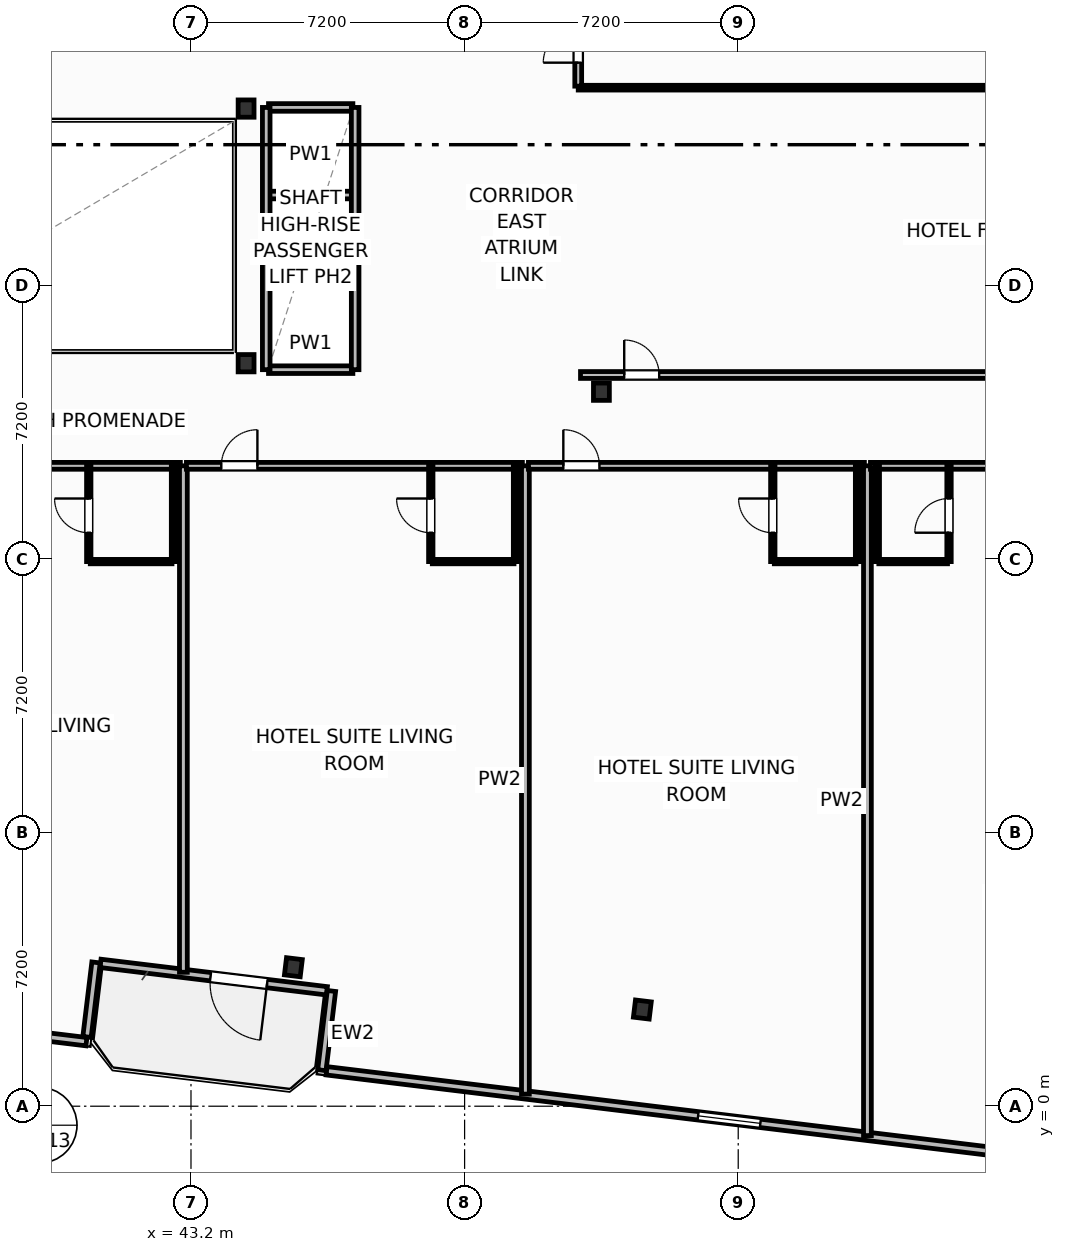
"""IFC4 building model, lengths in metres.
Left out: names, types, materials, properties, quantities, classifications, styles, units other than length and angle.
Written with IfcOpenShell. Run it as: python <this file> out.ifc"""

import sys

from ifc_helpers import new_model, si_unit, direction, frame, frame_2d, origin, origin_2d, place, context, subcontext, project, spatial, rectangle, i_section, extrude, element, fill, save


model = new_model("IFC4")
c1 = context("Model", 3, precision=1e-05, world=origin(), true_north=direction((0.0, 1.0)))
c2 = subcontext(c1, "Body", "Model", "MODEL_VIEW")
j1 = project(units=[si_unit("LENGTHUNIT", "METRE"), si_unit("PLANEANGLEUNIT", "RADIAN")], contexts=[c1])
p1 = place(None, origin())
s1 = spatial("IfcSite", under=j1, at=p1, CompositionType="ELEMENT")
p2 = place(p1, origin())
s2 = spatial("IfcBuilding", under=s1, at=p2, CompositionType="ELEMENT")
p3 = place(p2, frame((0.0, 0.0, 151.3)))
s3 = spatial("IfcBuildingStorey", under=s2, at=p3, CompositionType="ELEMENT", Elevation=151.3)
for number, where, z_axis, x_axis in (
    (1, (44.65, 19.55, 0.0), (0.0, 0.0, 1.0), (1.0, 0.0, 0.0)),
    (2, (44.65, 26.25, 0.0), (0.0, 0.0, 1.0), (1.0, 0.0, 0.0)),
    (3, (54.0, 18.8, 0.0), (0.0, 0.0, 1.0), (1.0, 0.0, 0.0)),
    (4, (45.894, 3.657, 0.0), (0.0, 0.0, 1.0), (0.993, -0.12, 0.0)),
    (5, (55.077, 2.544, 0.0), (0.0, 0.0, 1.0), (0.993, -0.12, 0.0)),
):
    element("IfcColumn", number, at=place(p3, frame(where, z_axis=z_axis, x_axis=x_axis)), inside=s3, PredefinedType="COLUMN", context=c2, shape_type="SweptSolid", body=[
        extrude(i_section(OverallWidth=0.418, OverallDepth=0.455, WebThickness=0.042, FlangeThickness=0.068, FilletRadius=0.025, at=origin_2d()), origin(), (0.0, 0.0, 1.0), 3.7),
    ])
p4 = place(p3, frame((46.776, 3.037, 0.0), z_axis=(0.0, 0.0, 1.0), x_axis=(-0.992735402148, 0.120318000826, 0.0)))
e6 = element("IfcWall", 6, at=p4, inside=s3, PredefinedType="SOLIDWALL", context=c2, shape_type="SweptSolid", body=[
    extrude(rectangle(XDim=6.0, YDim=0.22, at=frame_2d((3.0, 0.0))), origin(), (0.0, 0.0, 1.0), 2.73),
])
p5 = place(p4, frame((1.584, 0.0, 0.0)))
e7 = element("IfcOpeningElement", 7, at=p5, cuts=e6, PredefinedType="OPENING", context=c2, shape_type="SweptSolid", body=[
    extrude(rectangle(XDim=1.5, YDim=2.25, at=frame_2d((0.75, 1.125))), frame((0.0, 0.12, 0.0), z_axis=(0.0, -1.0, 0.0), x_axis=(1.0, 0.0, 0.0)), (0.0, 0.0, 1.0), 0.24),
])
p6 = place(p3, frame((32.472, 2.665, 0.0), z_axis=(0.0, 0.0, 1.0), x_axis=(0.992734661931, -0.120324108143, 0.0)))
e8 = element("IfcWall", 8, at=p6, inside=s3, PredefinedType="SOLIDWALL", context=c2, shape_type="SweptSolid", body=[
    extrude(rectangle(XDim=8.035, YDim=0.22, at=frame_2d((4.018, 0.0))), origin(), (0.0, 0.0, 1.0), 2.73),
])
p7 = place(p6, frame((3.192, 0.0, 0.8)))
e9 = element("IfcOpeningElement", 9, at=p7, cuts=e8, PredefinedType="OPENING", context=c2, shape_type="SweptSolid", body=[
    extrude(rectangle(XDim=1.65, YDim=1.65, at=frame_2d((0.825, 0.825))), frame((0.0, 0.12, 0.0), z_axis=(0.0, -1.0, 0.0), x_axis=(1.0, 0.0, 0.0)), (0.0, 0.0, 1.0), 0.24),
])
p8 = place(p3, frame((40.464, 1.822, 0.0), z_axis=(0.0, 0.0, 1.0), x_axis=(0.120275992932, 0.992740492538, 0.0)))
e10 = element("IfcWall", 10, at=p8, inside=s3, PredefinedType="SOLIDWALL", context=c2, shape_type="SweptSolid", body=[
    extrude(rectangle(XDim=1.975, YDim=0.22, at=frame_2d((0.988, 0.0))), origin(), (0.0, 0.0, 1.0), 2.73),
])
p9 = place(p3, frame((46.896, 3.032, 0.0), z_axis=(0.0, 0.0, 1.0), x_axis=(-0.120327895535, -0.992734202874, 0.0)))
e11 = element("IfcWall", 11, at=p9, inside=s3, PredefinedType="SOLIDWALL", context=c2, shape_type="SweptSolid", body=[
    extrude(rectangle(XDim=2.1, YDim=0.22, at=frame_2d((1.05, 0.0))), origin(), (0.0, 0.0, 1.0), 2.73),
])
p10 = place(p3, frame((46.768, 0.932, 0.0), z_axis=(0.0, 0.0, 1.0), x_axis=(0.992733036814, -0.120337515419, 0.0)))
e12 = element("IfcWall", 12, at=p10, inside=s3, PredefinedType="SOLIDWALL", context=c2, shape_type="SweptSolid", body=[
    extrude(rectangle(XDim=21.347, YDim=0.22, at=frame_2d((10.673, 0.0))), origin(), (0.0, 0.0, 1.0), 2.73),
])
p11 = place(p10, frame((9.849, 0.0, 0.8)))
e13 = element("IfcOpeningElement", 13, at=p11, cuts=e12, PredefinedType="OPENING", context=c2, shape_type="SweptSolid", body=[
    extrude(rectangle(XDim=1.65, YDim=1.65, at=frame_2d((0.825, 0.825))), frame((0.0, 0.12, 0.0), z_axis=(0.0, -1.0, 0.0), x_axis=(1.0, 0.0, 0.0)), (0.0, 0.0, 1.0), 0.24),
])
p12 = place(p3, frame((34.08, 16.85, 0.0), z_axis=(0.0, 0.0, 1.0), x_axis=(1.0, 0.0, 0.0)))
e14 = element("IfcWall", 14, at=p12, inside=s3, PredefinedType="PARTITIONING", context=c2, shape_type="SweptSolid", body=[
    extrude(rectangle(XDim=8.84, YDim=0.18, at=frame_2d((4.42, 0.0))), origin(), (0.0, 0.0, 1.0), 3.45),
])
p13 = place(p12, frame((0.918, 0.0, 0.0)))
e15 = element("IfcOpeningElement", 15, at=p13, cuts=e14, PredefinedType="OPENING", context=c2, shape_type="SweptSolid", body=[
    extrude(rectangle(XDim=0.95, YDim=2.15, at=frame_2d((0.475, 1.075))), frame((0.0, 0.1, 0.0), z_axis=(0.0, -1.0, 0.0), x_axis=(1.0, 0.0, 0.0)), (0.0, 0.0, 1.0), 0.2),
])
p14 = place(p3, frame((40.55, 14.33, 0.0), z_axis=(0.0, 0.0, 1.0), x_axis=(1.0, 0.0, 0.0)))
e16 = element("IfcWall", 16, at=p14, inside=s3, PredefinedType="PARTITIONING", context=c2, shape_type="SweptSolid", body=[
    extrude(rectangle(XDim=2.15, YDim=0.115, at=frame_2d((1.075, 0.0))), origin(), (0.0, 0.0, 1.0), 3.45),
])
p15 = place(p3, frame((40.51, 14.33, 0.0), z_axis=(0.0, 0.0, 1.0), x_axis=(0.0, 1.0, 0.0)))
e17 = element("IfcWall", 17, at=p15, inside=s3, PredefinedType="PARTITIONING", context=c2, shape_type="SweptSolid", body=[
    extrude(rectangle(XDim=2.52, YDim=0.115, at=frame_2d((1.26, 0.0))), origin(), (0.0, 0.0, 1.0), 3.45),
])
p16 = place(p15, frame((0.76, 0.0, 0.0)))
e18 = element("IfcOpeningElement", 18, at=p16, cuts=e17, PredefinedType="OPENING", context=c2, shape_type="SweptSolid", body=[
    extrude(rectangle(XDim=0.9, YDim=2.05, at=frame_2d((0.45, 1.025))), frame((0.0, 0.067, 0.0), z_axis=(0.0, -1.0, 0.0), x_axis=(1.0, 0.0, 0.0)), (0.0, 0.0, 1.0), 0.135),
])
p17 = place(p3, frame((42.74, 14.33, 0.0), z_axis=(0.0, 0.0, 1.0), x_axis=(0.0, 1.0, 0.0)))
e19 = element("IfcWall", 19, at=p17, inside=s3, PredefinedType="PARTITIONING", context=c2, shape_type="SweptSolid", body=[
    extrude(rectangle(XDim=2.52, YDim=0.115, at=frame_2d((1.26, 0.0))), origin(), (0.0, 0.0, 1.0), 3.45),
])
p18 = place(p3, frame((43.0, 3.524, 0.0), z_axis=(0.0, 0.0, 1.0), x_axis=(0.0, 1.0, 0.0)))
e20 = element("IfcWall", 20, at=p18, inside=s3, PredefinedType="PARTITIONING", context=c2, shape_type="SweptSolid", body=[
    extrude(rectangle(XDim=13.326, YDim=0.205, at=frame_2d((6.663, 0.0))), origin(), (0.0, 0.0, 1.0), 3.45),
])
p19 = place(p3, frame((43.08, 16.85, 0.0), z_axis=(0.0, 0.0, 1.0), x_axis=(1.0, 0.0, 0.0)))
e21 = element("IfcWall", 21, at=p19, inside=s3, PredefinedType="PARTITIONING", context=c2, shape_type="SweptSolid", body=[
    extrude(rectangle(XDim=8.84, YDim=0.18, at=frame_2d((4.42, 0.0))), origin(), (0.0, 0.0, 1.0), 3.45),
])
p20 = place(p19, frame((0.918, 0.0, 0.0)))
e22 = element("IfcOpeningElement", 22, at=p20, cuts=e21, PredefinedType="OPENING", context=c2, shape_type="SweptSolid", body=[
    extrude(rectangle(XDim=0.95, YDim=2.15, at=frame_2d((0.475, 1.075))), frame((0.0, 0.1, 0.0), z_axis=(0.0, -1.0, 0.0), x_axis=(1.0, 0.0, 0.0)), (0.0, 0.0, 1.0), 0.2),
])
p21 = place(p3, frame((49.55, 14.33, 0.0), z_axis=(0.0, 0.0, 1.0), x_axis=(1.0, 0.0, 0.0)))
e23 = element("IfcWall", 23, at=p21, inside=s3, PredefinedType="PARTITIONING", context=c2, shape_type="SweptSolid", body=[
    extrude(rectangle(XDim=2.15, YDim=0.115, at=frame_2d((1.075, 0.0))), origin(), (0.0, 0.0, 1.0), 3.45),
])
p22 = place(p3, frame((49.51, 14.33, 0.0), z_axis=(0.0, 0.0, 1.0), x_axis=(0.0, 1.0, 0.0)))
e24 = element("IfcWall", 24, at=p22, inside=s3, PredefinedType="PARTITIONING", context=c2, shape_type="SweptSolid", body=[
    extrude(rectangle(XDim=2.52, YDim=0.115, at=frame_2d((1.26, 0.0))), origin(), (0.0, 0.0, 1.0), 3.45),
])
p23 = place(p22, frame((0.76, 0.0, 0.0)))
e25 = element("IfcOpeningElement", 25, at=p23, cuts=e24, PredefinedType="OPENING", context=c2, shape_type="SweptSolid", body=[
    extrude(rectangle(XDim=0.9, YDim=2.05, at=frame_2d((0.45, 1.025))), frame((0.0, 0.067, 0.0), z_axis=(0.0, -1.0, 0.0), x_axis=(1.0, 0.0, 0.0)), (0.0, 0.0, 1.0), 0.135),
])
p24 = place(p3, frame((51.74, 14.33, 0.0), z_axis=(0.0, 0.0, 1.0), x_axis=(0.0, 1.0, 0.0)))
e26 = element("IfcWall", 26, at=p24, inside=s3, PredefinedType="PARTITIONING", context=c2, shape_type="SweptSolid", body=[
    extrude(rectangle(XDim=2.52, YDim=0.115, at=frame_2d((1.26, 0.0))), origin(), (0.0, 0.0, 1.0), 3.45),
])
p25 = place(p3, frame((52.0, 0.318, 0.0), z_axis=(0.0, 0.0, 1.0), x_axis=(0.0, 1.0, 0.0)))
e27 = element("IfcWall", 27, at=p25, inside=s3, PredefinedType="PARTITIONING", context=c2, shape_type="SweptSolid", body=[
    extrude(rectangle(XDim=16.532, YDim=0.205, at=frame_2d((8.266, 0.0))), origin(), (0.0, 0.0, 1.0), 3.45),
])
p26 = place(p3, frame((52.08, 16.85, 0.0), z_axis=(0.0, 0.0, 1.0), x_axis=(1.0, 0.0, 0.0)))
e28 = element("IfcWall", 28, at=p26, inside=s3, PredefinedType="PARTITIONING", context=c2, shape_type="SweptSolid", body=[
    extrude(rectangle(XDim=8.84, YDim=0.18, at=frame_2d((4.42, 0.0))), origin(), (0.0, 0.0, 1.0), 3.45),
])
p27 = place(p26, frame((0.918, 0.0, 0.0)))
e29 = element("IfcOpeningElement", 29, at=p27, cuts=e28, PredefinedType="OPENING", context=c2, shape_type="SweptSolid", body=[
    extrude(rectangle(XDim=0.95, YDim=2.15, at=frame_2d((0.475, 1.075))), frame((0.0, 0.1, 0.0), z_axis=(0.0, -1.0, 0.0), x_axis=(1.0, 0.0, 0.0)), (0.0, 0.0, 1.0), 0.2),
])
p28 = place(p3, frame((58.55, 14.33, 0.0), z_axis=(0.0, 0.0, 1.0), x_axis=(1.0, 0.0, 0.0)))
e30 = element("IfcWall", 30, at=p28, inside=s3, PredefinedType="PARTITIONING", context=c2, shape_type="SweptSolid", body=[
    extrude(rectangle(XDim=2.15, YDim=0.115, at=frame_2d((1.075, 0.0))), origin(), (0.0, 0.0, 1.0), 3.45),
])
p29 = place(p3, frame((58.51, 14.33, 0.0), z_axis=(0.0, 0.0, 1.0), x_axis=(0.0, 1.0, 0.0)))
e31 = element("IfcWall", 31, at=p29, inside=s3, PredefinedType="PARTITIONING", context=c2, shape_type="SweptSolid", body=[
    extrude(rectangle(XDim=2.52, YDim=0.115, at=frame_2d((1.26, 0.0))), origin(), (0.0, 0.0, 1.0), 3.45),
])
p30 = place(p29, frame((0.76, 0.0, 0.0)))
e32 = element("IfcOpeningElement", 32, at=p30, cuts=e31, PredefinedType="OPENING", context=c2, shape_type="SweptSolid", body=[
    extrude(rectangle(XDim=0.9, YDim=2.05, at=frame_2d((0.45, 1.025))), frame((0.0, 0.067, 0.0), z_axis=(0.0, -1.0, 0.0), x_axis=(1.0, 0.0, 0.0)), (0.0, 0.0, 1.0), 0.135),
])
p31 = place(p3, frame((60.74, 14.33, 0.0), z_axis=(0.0, 0.0, 1.0), x_axis=(0.0, 1.0, 0.0)))
e33 = element("IfcWall", 33, at=p31, inside=s3, PredefinedType="PARTITIONING", context=c2, shape_type="SweptSolid", body=[
    extrude(rectangle(XDim=2.52, YDim=0.115, at=frame_2d((1.26, 0.0))), origin(), (0.0, 0.0, 1.0), 3.45),
])
p32 = place(p3, frame((61.0, -0.773, 0.0), z_axis=(0.0, 0.0, 1.0), x_axis=(0.0, 1.0, 0.0)))
e34 = element("IfcWall", 34, at=p32, inside=s3, PredefinedType="PARTITIONING", context=c2, shape_type="SweptSolid", body=[
    extrude(rectangle(XDim=17.623, YDim=0.205, at=frame_2d((8.812, 0.0))), origin(), (0.0, 0.0, 1.0), 3.45),
])
p33 = place(p3, frame((61.08, 16.85, 0.0), z_axis=(0.0, 0.0, 1.0), x_axis=(1.0, 0.0, 0.0)))
e35 = element("IfcWall", 35, at=p33, inside=s3, PredefinedType="PARTITIONING", context=c2, shape_type="SweptSolid", body=[
    extrude(rectangle(XDim=14.387, YDim=0.18, at=frame_2d((7.193, 0.0))), origin(), (0.0, 0.0, 1.0), 3.45),
])
p34 = place(p33, frame((3.11, 0.0, 0.0)))
e36 = element("IfcOpeningElement", 36, at=p34, cuts=e35, PredefinedType="OPENING", context=c2, shape_type="SweptSolid", body=[
    extrude(rectangle(XDim=0.95, YDim=2.15, at=frame_2d((0.475, 1.075))), frame((0.0, 0.1, 0.0), z_axis=(0.0, -1.0, 0.0), x_axis=(1.0, 0.0, 0.0)), (0.0, 0.0, 1.0), 0.2),
])
p35 = place(p3, frame((61.3, 14.33, 0.0), z_axis=(0.0, 0.0, 1.0), x_axis=(1.0, 0.0, 0.0)))
e37 = element("IfcWall", 37, at=p35, inside=s3, PredefinedType="PARTITIONING", context=c2, shape_type="SweptSolid", body=[
    extrude(rectangle(XDim=1.807, YDim=0.115, at=frame_2d((0.904, 0.0))), origin(), (0.0, 0.0, 1.0), 3.45),
])
p36 = place(p3, frame((63.147, 14.33, 0.0), z_axis=(0.0, 0.0, 1.0), x_axis=(0.0, 1.0, 0.0)))
e38 = element("IfcWall", 38, at=p36, inside=s3, PredefinedType="PARTITIONING", context=c2, shape_type="SweptSolid", body=[
    extrude(rectangle(XDim=2.52, YDim=0.115, at=frame_2d((1.26, 0.0))), origin(), (0.0, 0.0, 1.0), 3.45),
])
p37 = place(p36, frame((0.76, 0.0, 0.0)))
e39 = element("IfcOpeningElement", 39, at=p37, cuts=e38, PredefinedType="OPENING", context=c2, shape_type="SweptSolid", body=[
    extrude(rectangle(XDim=0.9, YDim=2.05, at=frame_2d((0.45, 1.025))), frame((0.0, 0.067, 0.0), z_axis=(0.0, -1.0, 0.0), x_axis=(1.0, 0.0, 0.0)), (0.0, 0.0, 1.0), 0.135),
])
p38 = place(p3, frame((61.26, 14.33, 0.0), z_axis=(0.0, 0.0, 1.0), x_axis=(0.0, 1.0, 0.0)))
e40 = element("IfcWall", 40, at=p38, inside=s3, PredefinedType="PARTITIONING", context=c2, shape_type="SweptSolid", body=[
    extrude(rectangle(XDim=2.52, YDim=0.115, at=frame_2d((1.26, 0.0))), origin(), (0.0, 0.0, 1.0), 3.45),
])
p39 = place(p3, frame((53.45, 19.24, 0.0), z_axis=(0.0, 0.0, 1.0), x_axis=(1.0, 0.0, 0.0)))
e41 = element("IfcWall", 41, at=p39, inside=s3, PredefinedType="PARTITIONING", context=c2, shape_type="SweptSolid", body=[
    extrude(rectangle(XDim=22.307, YDim=0.18, at=frame_2d((11.153, 0.0))), origin(), (0.0, 0.0, 1.0), 2.662),
])
p40 = place(p39, frame((1.15, 0.0, 0.0)))
e42 = element("IfcOpeningElement", 42, at=p40, cuts=e41, PredefinedType="OPENING", context=c2, shape_type="SweptSolid", body=[
    extrude(rectangle(XDim=0.92, YDim=2.05, at=frame_2d((0.46, 1.025))), frame((0.0, 0.1, 0.0), z_axis=(0.0, -1.0, 0.0), x_axis=(1.0, 0.0, 0.0)), (0.0, 0.0, 1.0), 0.2),
])
p41 = place(p3, frame((53.39, 26.8, 0.0), z_axis=(0.0, 0.0, 1.0), x_axis=(1.0, 0.0, 0.0)))
e43 = element("IfcWall", 43, at=p41, inside=s3, PredefinedType="PARTITIONING", context=c2, shape_type="SweptSolid", body=[
    extrude(rectangle(XDim=23.283, YDim=0.125, at=frame_2d((11.642, 0.0))), origin(), (0.0, 0.0, 1.0), 3.45),
])
p42 = place(p3, frame((53.39, 26.84, 0.0), z_axis=(0.0, 0.0, 1.0), x_axis=(0.0, 1.0, 0.0)))
e44 = element("IfcWall", 44, at=p42, inside=s3, PredefinedType="PARTITIONING", context=c2, shape_type="SweptSolid", body=[
    extrude(rectangle(XDim=12.46, YDim=0.18, at=frame_2d((6.23, 0.0))), origin(), (0.0, 0.0, 1.0), 3.45),
])
p43 = place(p42, frame((0.618, 0.0, 0.0)))
e45 = element("IfcOpeningElement", 45, at=p43, cuts=e44, PredefinedType="OPENING", context=c2, shape_type="SweptSolid", body=[
    extrude(rectangle(XDim=0.92, YDim=2.05, at=frame_2d((0.46, 1.025))), frame((0.0, 0.1, 0.0), z_axis=(0.0, -1.0, 0.0), x_axis=(1.0, 0.0, 0.0)), (0.0, 0.0, 1.0), 0.2),
])
for number, where, z_axis, x_axis in (
    (46, (45.24, 21.675, 0.0), (0.0, 0.0, 1.0), (1.0, 0.0, 0.0)),
    (47, (45.24, 23.975, 0.0), (0.0, 0.0, 1.0), (1.0, 0.0, 0.0)),
):
    element("IfcWall", number, at=place(p3, frame(where, z_axis=z_axis, x_axis=x_axis)), inside=s3, PredefinedType="PARTITIONING", context=c2, shape_type="SweptSolid", body=[
        extrude(rectangle(XDim=2.22, YDim=0.2, at=frame_2d((1.11, 0.0))), origin(), (0.0, 0.0, 1.0), 3.45),
    ])
p44 = place(p3, frame((45.24, 19.38, 0.0), z_axis=(0.0, 0.0, 1.0), x_axis=(1.0, 0.0, 0.0)))
e48 = element("IfcWall", 48, at=p44, inside=s3, PredefinedType="PARTITIONING", context=c2, shape_type="SweptSolid", body=[
    extrude(rectangle(XDim=2.22, YDim=0.2, at=frame_2d((1.11, 0.0))), origin(), (0.0, 0.0, 1.0), 2.662),
])
p45 = place(p3, frame((45.24, 26.28, 0.0), z_axis=(0.0, 0.0, 1.0), x_axis=(1.0, 0.0, 0.0)))
e49 = element("IfcWall", 49, at=p45, inside=s3, PredefinedType="PARTITIONING", context=c2, shape_type="SweptSolid", body=[
    extrude(rectangle(XDim=2.22, YDim=0.2, at=frame_2d((1.11, 0.0))), origin(), (0.0, 0.0, 1.0), 3.45),
])
for number, where, z_axis, x_axis in (
    (50, (45.18, 19.38, 0.0), (0.0, 0.0, 1.0), (0.0, 1.0, 0.0)),
    (51, (47.52, 19.38, 0.0), (0.0, 0.0, 1.0), (0.0, 1.0, 0.0)),
):
    element("IfcWall", number, at=place(p3, frame(where, z_axis=z_axis, x_axis=x_axis)), inside=s3, PredefinedType="PARTITIONING", context=c2, shape_type="SweptSolid", body=[
        extrude(rectangle(XDim=6.9, YDim=0.2, at=frame_2d((3.45, 0.0))), origin(), (0.0, 0.0, 1.0), 3.45),
    ])
p46 = place(p5, origin())
e52 = element("IfcDoor", 52, at=p46, inside=s3, OperationType="SINGLE_SWING_LEFT", PredefinedType="DOOR", context=c2, shape_type="SweptSolid", body=[
    extrude(rectangle(XDim=1.5, YDim=2.25, at=frame_2d((0.75, 1.125))), frame((0.0, 0.025, 0.0), z_axis=(0.0, -1.0, 0.0), x_axis=(1.0, 0.0, 0.0)), (0.0, 0.0, 1.0), 0.05),
])
fill(e7, e52)
p47 = place(p11, origin())
e53 = element("IfcWindow", 53, at=p47, inside=s3, PartitioningType="SINGLE_PANEL", PredefinedType="WINDOW", context=c2, shape_type="SweptSolid", body=[
    extrude(rectangle(XDim=1.65, YDim=1.65, at=frame_2d((0.825, 0.825))), frame((0.0, 0.03, 0.0), z_axis=(0.0, -1.0, 0.0), x_axis=(1.0, 0.0, 0.0)), (0.0, 0.0, 1.0), 0.06),
])
fill(e13, e53)
p48 = place(p16, origin())
e54 = element("IfcDoor", 54, at=p48, inside=s3, OperationType="SINGLE_SWING_RIGHT", PredefinedType="DOOR", context=c2, shape_type="SweptSolid", body=[
    extrude(rectangle(XDim=0.9, YDim=2.05, at=frame_2d((0.45, 1.025))), frame((0.0, 0.025, 0.0), z_axis=(0.0, -1.0, 0.0), x_axis=(1.0, 0.0, 0.0)), (0.0, 0.0, 1.0), 0.05),
])
fill(e18, e54)
p49 = place(p20, origin())
e55 = element("IfcDoor", 55, at=p49, inside=s3, OperationType="SINGLE_SWING_RIGHT", PredefinedType="DOOR", context=c2, shape_type="SweptSolid", body=[
    extrude(rectangle(XDim=0.95, YDim=2.15, at=frame_2d((0.475, 1.075))), frame((0.0, 0.025, 0.0), z_axis=(0.0, -1.0, 0.0), x_axis=(1.0, 0.0, 0.0)), (0.0, 0.0, 1.0), 0.05),
])
fill(e22, e55)
p50 = place(p23, origin())
e56 = element("IfcDoor", 56, at=p50, inside=s3, OperationType="SINGLE_SWING_RIGHT", PredefinedType="DOOR", context=c2, shape_type="SweptSolid", body=[
    extrude(rectangle(XDim=0.9, YDim=2.05, at=frame_2d((0.45, 1.025))), frame((0.0, 0.025, 0.0), z_axis=(0.0, -1.0, 0.0), x_axis=(1.0, 0.0, 0.0)), (0.0, 0.0, 1.0), 0.05),
])
fill(e25, e56)
p51 = place(p27, origin())
e57 = element("IfcDoor", 57, at=p51, inside=s3, OperationType="SINGLE_SWING_LEFT", PredefinedType="DOOR", context=c2, shape_type="SweptSolid", body=[
    extrude(rectangle(XDim=0.95, YDim=2.15, at=frame_2d((0.475, 1.075))), frame((0.0, 0.025, 0.0), z_axis=(0.0, -1.0, 0.0), x_axis=(1.0, 0.0, 0.0)), (0.0, 0.0, 1.0), 0.05),
])
fill(e29, e57)
p52 = place(p30, origin())
e58 = element("IfcDoor", 58, at=p52, inside=s3, OperationType="SINGLE_SWING_RIGHT", PredefinedType="DOOR", context=c2, shape_type="SweptSolid", body=[
    extrude(rectangle(XDim=0.9, YDim=2.05, at=frame_2d((0.45, 1.025))), frame((0.0, 0.025, 0.0), z_axis=(0.0, -1.0, 0.0), x_axis=(1.0, 0.0, 0.0)), (0.0, 0.0, 1.0), 0.05),
])
fill(e32, e58)
p53 = place(p37, origin())
e59 = element("IfcDoor", 59, at=p53, inside=s3, OperationType="SINGLE_SWING_LEFT", PredefinedType="DOOR", context=c2, shape_type="SweptSolid", body=[
    extrude(rectangle(XDim=0.9, YDim=2.05, at=frame_2d((0.45, 1.025))), frame((0.0, 0.025, 0.0), z_axis=(0.0, -1.0, 0.0), x_axis=(1.0, 0.0, 0.0)), (0.0, 0.0, 1.0), 0.05),
])
fill(e39, e59)
p54 = place(p40, origin())
e60 = element("IfcDoor", 60, at=p54, inside=s3, OperationType="SINGLE_SWING_LEFT", PredefinedType="DOOR", context=c2, shape_type="SweptSolid", body=[
    extrude(rectangle(XDim=0.92, YDim=2.05, at=frame_2d((0.46, 1.025))), frame((0.0, 0.025, 0.0), z_axis=(0.0, -1.0, 0.0), x_axis=(1.0, 0.0, 0.0)), (0.0, 0.0, 1.0), 0.05),
])
fill(e42, e60)
p55 = place(p43, origin())
e61 = element("IfcDoor", 61, at=p55, inside=s3, OperationType="SINGLE_SWING_LEFT", PredefinedType="DOOR", context=c2, shape_type="SweptSolid", body=[
    extrude(rectangle(XDim=0.92, YDim=2.05, at=frame_2d((0.46, 1.025))), frame((0.0, 0.025, 0.0), z_axis=(0.0, -1.0, 0.0), x_axis=(1.0, 0.0, 0.0)), (0.0, 0.0, 1.0), 0.05),
])
fill(e45, e61)
save(model, sys.argv[1])
